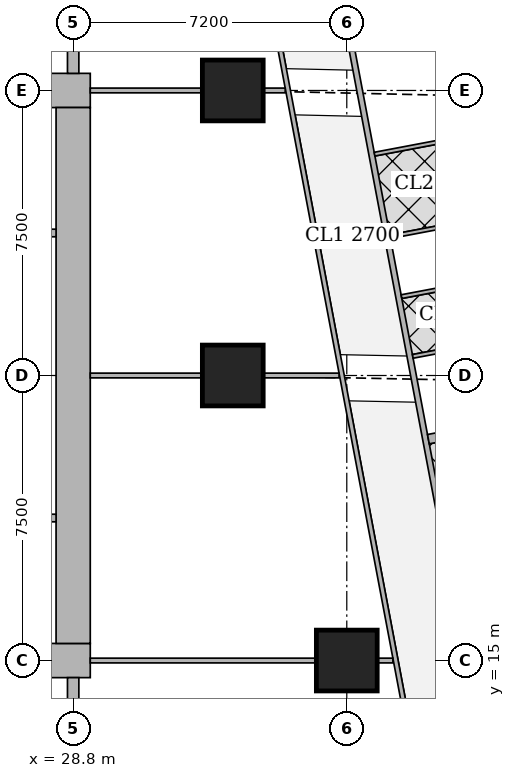
"""IFC4 building model, lengths in metres.
Left out: names, types, materials, properties, quantities, classifications, styles, units other than length and angle.
Written with IfcOpenShell. Run it as: python <this file> out.ifc"""

import sys

from ifc_helpers import new_model, si_unit, direction, frame, frame_2d, origin, origin_2d, place, context, subcontext, project, spatial, rectangle, extrude, element, fill, save


model = new_model("IFC4")
c1 = context("Model", 3, precision=1e-05, world=origin(), true_north=direction((0.0, 1.0)))
c2 = subcontext(c1, "Body", "Model", "MODEL_VIEW")
j1 = project(units=[si_unit("LENGTHUNIT", "METRE"), si_unit("PLANEANGLEUNIT", "RADIAN")], contexts=[c1])
p1 = place(None, origin())
s1 = spatial("IfcSite", under=j1, at=p1, CompositionType="ELEMENT")
p2 = place(p1, origin())
s2 = spatial("IfcBuilding", under=s1, at=p2, CompositionType="ELEMENT")
p3 = place(p2, frame((0.0, 0.0, 100.4)))
s3 = spatial("IfcBuildingStorey", under=s2, at=p3, CompositionType="ELEMENT", Elevation=100.4)
for number, where, z_axis, x_axis in (
    (1, (36.0, 15.0, 0.0), (0.0, 0.0, 1.0), (1.0, 0.0, 0.0)),
    (2, (33.0, 22.5, 0.0), (0.0, 0.0, 1.0), (1.0, 0.0, 0.0)),
    (3, (33.0, 30.0, 0.0), (0.0, 0.0, 1.0), (1.0, 0.0, 0.0)),
):
    element("IfcColumn", number, at=place(p3, frame(where, z_axis=z_axis, x_axis=x_axis)), inside=s3, PredefinedType="COLUMN", context=c2, shape_type="SweptSolid", body=[
        extrude(rectangle(XDim=1.6, YDim=1.6, at=origin_2d()), origin(), (0.0, 0.0, 1.0), 3.75),
    ])
p4 = place(p3, frame((13.95, 15.0, 0.0), z_axis=(0.0, 0.0, 1.0), x_axis=(1.0, 0.0, 0.0)))
e4 = element("IfcWall", 4, at=p4, inside=s3, PredefinedType="SHEAR", context=c2, shape_type="SweptSolid", body=[
    extrude(rectangle(XDim=15.3, YDim=0.9, at=frame_2d((7.65, 0.0))), origin(), (0.0, 0.0, 1.0), 3.75),
])
p5 = place(p4, frame((4.45, 0.0, 0.0)))
e5 = element("IfcOpeningElement", 5, at=p5, cuts=e4, PredefinedType="OPENING", context=c2, shape_type="SweptSolid", body=[
    extrude(rectangle(XDim=1.8, YDim=2.1, at=frame_2d((0.9, 1.05))), frame((0.0, 0.46, 0.0), z_axis=(0.0, -1.0, 0.0), x_axis=(1.0, 0.0, 0.0)), (0.0, 0.0, 1.0), 0.92),
])
p6 = place(p4, frame((10.7, 0.0, 0.0)))
e6 = element("IfcOpeningElement", 6, at=p6, cuts=e4, PredefinedType="OPENING", context=c2, shape_type="SweptSolid", body=[
    extrude(rectangle(XDim=1.1, YDim=2.1, at=frame_2d((0.55, 1.05))), frame((0.0, 0.46, 0.0), z_axis=(0.0, -1.0, 0.0), x_axis=(1.0, 0.0, 0.0)), (0.0, 0.0, 1.0), 0.92),
])
p7 = place(p3, frame((13.95, 30.0, 0.0), z_axis=(0.0, 0.0, 1.0), x_axis=(1.0, 0.0, 0.0)))
e7 = element("IfcWall", 7, at=p7, inside=s3, PredefinedType="SHEAR", context=c2, shape_type="SweptSolid", body=[
    extrude(rectangle(XDim=15.3, YDim=0.9, at=frame_2d((7.65, 0.0))), origin(), (0.0, 0.0, 1.0), 3.75),
])
p8 = place(p7, frame((4.45, 0.0, 0.0)))
e8 = element("IfcOpeningElement", 8, at=p8, cuts=e7, PredefinedType="OPENING", context=c2, shape_type="SweptSolid", body=[
    extrude(rectangle(XDim=1.8, YDim=2.1, at=frame_2d((0.9, 1.05))), frame((0.0, 0.46, 0.0), z_axis=(0.0, -1.0, 0.0), x_axis=(1.0, 0.0, 0.0)), (0.0, 0.0, 1.0), 0.92),
])
p9 = place(p7, frame((10.7, 0.0, 0.0)))
e9 = element("IfcOpeningElement", 9, at=p9, cuts=e7, PredefinedType="OPENING", context=c2, shape_type="SweptSolid", body=[
    extrude(rectangle(XDim=1.1, YDim=2.1, at=frame_2d((0.55, 1.05))), frame((0.0, 0.46, 0.0), z_axis=(0.0, -1.0, 0.0), x_axis=(1.0, 0.0, 0.0)), (0.0, 0.0, 1.0), 0.92),
])
p10 = place(p3, frame((28.8, 15.45, 0.0), z_axis=(0.0, 0.0, 1.0), x_axis=(0.0, 1.0, 0.0)))
e10 = element("IfcWall", 10, at=p10, inside=s3, PredefinedType="SHEAR", context=c2, shape_type="SweptSolid", body=[
    extrude(rectangle(XDim=14.1, YDim=0.9, at=frame_2d((7.05, 0.0))), origin(), (0.0, 0.0, 1.0), 3.75),
])
for number, where, z_axis, x_axis in (
    (11, (28.8, 10.35, 0.0), (0.0, 0.0, 1.0), (0.0, 1.0, 0.0)),
    (12, (28.8, 30.45, 0.0), (0.0, 0.0, 1.0), (0.0, 1.0, 0.0)),
):
    element("IfcWall", number, at=place(p3, frame(where, z_axis=z_axis, x_axis=x_axis)), inside=s3, PredefinedType="SHEAR", context=c2, shape_type="SweptSolid", body=[
        extrude(rectangle(XDim=4.2, YDim=0.3, at=frame_2d((2.1, 0.0))), origin(), (0.0, 0.0, 1.0), 3.75),
    ])
p11 = place(p3, frame((33.382, 45.65, 0.0), z_axis=(0.0, 0.0, 1.0), x_axis=(0.185593544777, -0.982626600565, 0.0)))
e13 = element("IfcWall", 13, at=p11, inside=s3, PredefinedType="SOLIDWALL", context=c2, shape_type="SweptSolid", body=[
    extrude(rectangle(XDim=47.118, YDim=0.15, at=frame_2d((23.559, 0.0))), origin(), (0.0, 0.0, 1.0), 2.2),
])
p12 = place(p11, frame((10.662, 0.0, 0.0)))
e14 = element("IfcOpeningElement", 14, at=p12, cuts=e13, PredefinedType="OPENING", context=c2, shape_type="SweptSolid", body=[
    extrude(rectangle(XDim=1.0, YDim=2.1, at=frame_2d((0.5, 1.05))), frame((0.0, 0.085, 0.0), z_axis=(0.0, -1.0, 0.0), x_axis=(1.0, 0.0, 0.0)), (0.0, 0.0, 1.0), 0.17),
])
p13 = place(p11, frame((15.237, 0.0, 0.0)))
e15 = element("IfcOpeningElement", 15, at=p13, cuts=e13, PredefinedType="OPENING", context=c2, shape_type="SweptSolid", body=[
    extrude(rectangle(XDim=1.0, YDim=2.1, at=frame_2d((0.5, 1.05))), frame((0.0, 0.085, 0.0), z_axis=(0.0, -1.0, 0.0), x_axis=(1.0, 0.0, 0.0)), (0.0, 0.0, 1.0), 0.17),
])
p14 = place(p11, frame((27.341, 0.0, 0.0)))
e16 = element("IfcOpeningElement", 16, at=p14, cuts=e13, PredefinedType="OPENING", context=c2, shape_type="SweptSolid", body=[
    extrude(rectangle(XDim=1.0, YDim=2.1, at=frame_2d((0.5, 1.05))), frame((0.0, 0.085, 0.0), z_axis=(0.0, -1.0, 0.0), x_axis=(1.0, 0.0, 0.0)), (0.0, 0.0, 1.0), 0.17),
])
p15 = place(p11, frame((33.833, 0.0, 0.0)))
e17 = element("IfcOpeningElement", 17, at=p15, cuts=e13, PredefinedType="OPENING", context=c2, shape_type="SweptSolid", body=[
    extrude(rectangle(XDim=1.0, YDim=2.1, at=frame_2d((0.5, 1.05))), frame((0.0, 0.085, 0.0), z_axis=(0.0, -1.0, 0.0), x_axis=(1.0, 0.0, 0.0)), (0.0, 0.0, 1.0), 0.17),
])
p16 = place(p3, frame((39.948, 28.933, 0.0), z_axis=(0.0, 0.0, 1.0), x_axis=(-0.982542259571, -0.186039533857, 0.0)))
e18 = element("IfcWall", 18, at=p16, inside=s3, PredefinedType="PARTITIONING", context=c2, shape_type="SweptSolid", body=[
    extrude(rectangle(XDim=3.274, YDim=0.1, at=frame_2d((1.637, 0.0))), origin(), (0.0, 0.0, 1.0), 3.5),
])
p17 = place(p3, frame((40.656, 25.183, 0.0), z_axis=(0.0, 0.0, 1.0), x_axis=(-0.982596739811, -0.18575157311, 0.0)))
e19 = element("IfcWall", 19, at=p17, inside=s3, PredefinedType="PARTITIONING", context=c2, shape_type="SweptSolid", body=[
    extrude(rectangle(XDim=3.274, YDim=0.1, at=frame_2d((1.637, 0.0))), origin(), (0.0, 0.0, 1.0), 3.5),
])
p18 = place(p3, frame((40.358, 26.761, 0.0), z_axis=(0.0, 0.0, 1.0), x_axis=(-0.982607776398, -0.185693181787, 0.0)))
e20 = element("IfcWall", 20, at=p18, inside=s3, PredefinedType="PARTITIONING", context=c2, shape_type="SweptSolid", body=[
    extrude(rectangle(XDim=3.274, YDim=0.1, at=frame_2d((1.637, 0.0))), origin(), (0.0, 0.0, 1.0), 3.5),
])
p19 = place(p3, frame((40.954, 23.61, 0.0), z_axis=(0.0, 0.0, 1.0), x_axis=(-0.982661397469, -0.185409217473, 0.0)))
e21 = element("IfcWall", 21, at=p19, inside=s3, PredefinedType="PARTITIONING", context=c2, shape_type="SweptSolid", body=[
    extrude(rectangle(XDim=3.275, YDim=0.1, at=frame_2d((1.637, 0.0))), origin(), (0.0, 0.0, 1.0), 2.5),
])
p20 = place(p3, frame((42.593, 21.665, 0.0), z_axis=(0.0, 0.0, 1.0), x_axis=(-0.982612837616, -0.185666398014, 0.0)))
e22 = element("IfcWall", 22, at=p20, inside=s3, PredefinedType="SOLIDWALL", context=c2, shape_type="SweptSolid", body=[
    extrude(rectangle(XDim=4.525, YDim=0.25, at=frame_2d((2.262, 0.0))), origin(), (0.0, 0.0, 1.0), 2.5),
])
p21 = place(p3, frame((38.202, 10.163, 0.0), z_axis=(0.0, 0.0, 1.0), x_axis=(-0.185610321132, 0.982623431783, 0.0)))
e23 = element("IfcWall", 23, at=p21, inside=s3, PredefinedType="PARTITIONING", context=c2, shape_type="SweptSolid", body=[
    extrude(rectangle(XDim=25.111, YDim=0.125, at=frame_2d((12.556, 0.0))), origin(), (0.0, 0.0, 1.0), 2.5),
])
p22 = place(p21, frame((0.708, 0.0, 0.0)))
e24 = element("IfcOpeningElement", 24, at=p22, cuts=e23, PredefinedType="OPENING", context=c2, shape_type="SweptSolid", body=[
    extrude(rectangle(XDim=1.0, YDim=2.1, at=frame_2d((0.5, 1.05))), frame((0.0, 0.073, 0.0), z_axis=(0.0, -1.0, 0.0), x_axis=(1.0, 0.0, 0.0)), (0.0, 0.0, 1.0), 0.145),
])
p23 = place(p21, frame((6.0, 0.0, 0.0)))
e25 = element("IfcOpeningElement", 25, at=p23, cuts=e23, PredefinedType="OPENING", context=c2, shape_type="SweptSolid", body=[
    extrude(rectangle(XDim=1.0, YDim=2.1, at=frame_2d((0.5, 1.05))), frame((0.0, 0.073, 0.0), z_axis=(0.0, -1.0, 0.0), x_axis=(1.0, 0.0, 0.0)), (0.0, 0.0, 1.0), 0.145),
])
p24 = place(p21, frame((13.378, 0.0, 0.0)))
e26 = element("IfcOpeningElement", 26, at=p24, cuts=e23, PredefinedType="OPENING", context=c2, shape_type="SweptSolid", body=[
    extrude(rectangle(XDim=1.0, YDim=2.1, at=frame_2d((0.5, 1.05))), frame((0.0, 0.073, 0.0), z_axis=(0.0, -1.0, 0.0), x_axis=(1.0, 0.0, 0.0)), (0.0, 0.0, 1.0), 0.145),
])
p25 = place(p21, frame((21.25, 0.0, 0.0)))
e27 = element("IfcOpeningElement", 27, at=p25, cuts=e23, PredefinedType="OPENING", context=c2, shape_type="SweptSolid", body=[
    extrude(rectangle(XDim=1.0, YDim=2.1, at=frame_2d((0.5, 1.05))), frame((0.0, 0.073, 0.0), z_axis=(0.0, -1.0, 0.0), x_axis=(1.0, 0.0, 0.0)), (0.0, 0.0, 1.0), 0.145),
])
p26 = place(p3, frame((29.25, 15.0, 0.0), z_axis=(0.0, 0.0, 1.0), x_axis=(1.0, 0.0, 0.0)))
e28 = element("IfcWall", 28, at=p26, inside=s3, PredefinedType="PARTITIONING", context=c2, shape_type="SweptSolid", body=[
    extrude(rectangle(XDim=5.949, YDim=0.125, at=frame_2d((2.975, 0.0))), origin(), (0.0, 0.0, 1.0), 3.5),
])
p27 = place(p3, frame((36.801, 15.0, 0.0), z_axis=(0.0, 0.0, 1.0), x_axis=(1.0, 0.0, 0.0)))
e29 = element("IfcWall", 29, at=p27, inside=s3, PredefinedType="PARTITIONING", context=c2, shape_type="SweptSolid", body=[
    extrude(rectangle(XDim=0.412, YDim=0.125, at=frame_2d((0.206, 0.0))), origin(), (0.0, 0.0, 1.0), 3.5),
])
p28 = place(p3, frame((29.25, 22.5, 0.0), z_axis=(0.0, 0.0, 1.0), x_axis=(1.0, 0.0, 0.0)))
e30 = element("IfcWall", 30, at=p28, inside=s3, PredefinedType="PARTITIONING", context=c2, shape_type="SweptSolid", body=[
    extrude(rectangle(XDim=2.949, YDim=0.125, at=frame_2d((1.475, 0.0))), origin(), (0.0, 0.0, 1.0), 3.5),
])
p29 = place(p3, frame((33.801, 22.5, 0.0), z_axis=(0.0, 0.0, 1.0), x_axis=(1.0, 0.0, 0.0)))
e31 = element("IfcWall", 31, at=p29, inside=s3, PredefinedType="PARTITIONING", context=c2, shape_type="SweptSolid", body=[
    extrude(rectangle(XDim=1.995, YDim=0.125, at=frame_2d((0.998, 0.0))), origin(), (0.0, 0.0, 1.0), 2.5),
])
p30 = place(p3, frame((29.25, 30.0, 0.0), z_axis=(0.0, 0.0, 1.0), x_axis=(1.0, 0.0, 0.0)))
e32 = element("IfcWall", 32, at=p30, inside=s3, PredefinedType="PARTITIONING", context=c2, shape_type="SweptSolid", body=[
    extrude(rectangle(XDim=2.949, YDim=0.125, at=frame_2d((1.475, 0.0))), origin(), (0.0, 0.0, 1.0), 3.5),
])
p31 = place(p3, frame((33.801, 30.0, 0.0), z_axis=(0.0, 0.0, 1.0), x_axis=(1.0, 0.0, 0.0)))
e33 = element("IfcWall", 33, at=p31, inside=s3, PredefinedType="PARTITIONING", context=c2, shape_type="SweptSolid", body=[
    extrude(rectangle(XDim=0.578, YDim=0.125, at=frame_2d((0.289, 0.0))), origin(), (0.0, 0.0, 1.0), 2.5),
])
for number, where, z_axis, x_axis in (
    (34, (27.4, 18.75, 0.0), (0.0, 0.0, 1.0), (1.0, 0.0, 0.0)),
    (35, (27.4, 26.25, 0.0), (0.0, 0.0, 1.0), (1.0, 0.0, 0.0)),
):
    element("IfcWall", number, at=place(p3, frame(where, z_axis=z_axis, x_axis=x_axis)), inside=s3, PredefinedType="SOLIDWALL", context=c2, shape_type="SweptSolid", body=[
        extrude(rectangle(XDim=0.95, YDim=0.2, at=frame_2d((0.475, 0.0))), origin(), (0.0, 0.0, 1.0), 3.5),
    ])
p32 = place(p13, origin())
e36 = element("IfcDoor", 36, at=p32, inside=s3, OperationType="SINGLE_SWING_LEFT", PredefinedType="DOOR", context=c2, shape_type="SweptSolid", body=[
    extrude(rectangle(XDim=1.0, YDim=2.1, at=frame_2d((0.5, 1.05))), frame((0.0, 0.025, 0.0), z_axis=(0.0, -1.0, 0.0), x_axis=(1.0, 0.0, 0.0)), (0.0, 0.0, 1.0), 0.05),
])
fill(e15, e36)
p33 = place(p23, origin())
e37 = element("IfcDoor", 37, at=p33, inside=s3, OperationType="SINGLE_SWING_LEFT", PredefinedType="DOOR", context=c2, shape_type="SweptSolid", body=[
    extrude(rectangle(XDim=1.0, YDim=2.1, at=frame_2d((0.5, 1.05))), frame((0.0, 0.025, 0.0), z_axis=(0.0, -1.0, 0.0), x_axis=(1.0, 0.0, 0.0)), (0.0, 0.0, 1.0), 0.05),
])
fill(e25, e37)
p34 = place(p24, origin())
e38 = element("IfcDoor", 38, at=p34, inside=s3, OperationType="SINGLE_SWING_LEFT", PredefinedType="DOOR", context=c2, shape_type="SweptSolid", body=[
    extrude(rectangle(XDim=1.0, YDim=2.1, at=frame_2d((0.5, 1.05))), frame((0.0, 0.025, 0.0), z_axis=(0.0, -1.0, 0.0), x_axis=(1.0, 0.0, 0.0)), (0.0, 0.0, 1.0), 0.05),
])
fill(e26, e38)
save(model, sys.argv[1])
